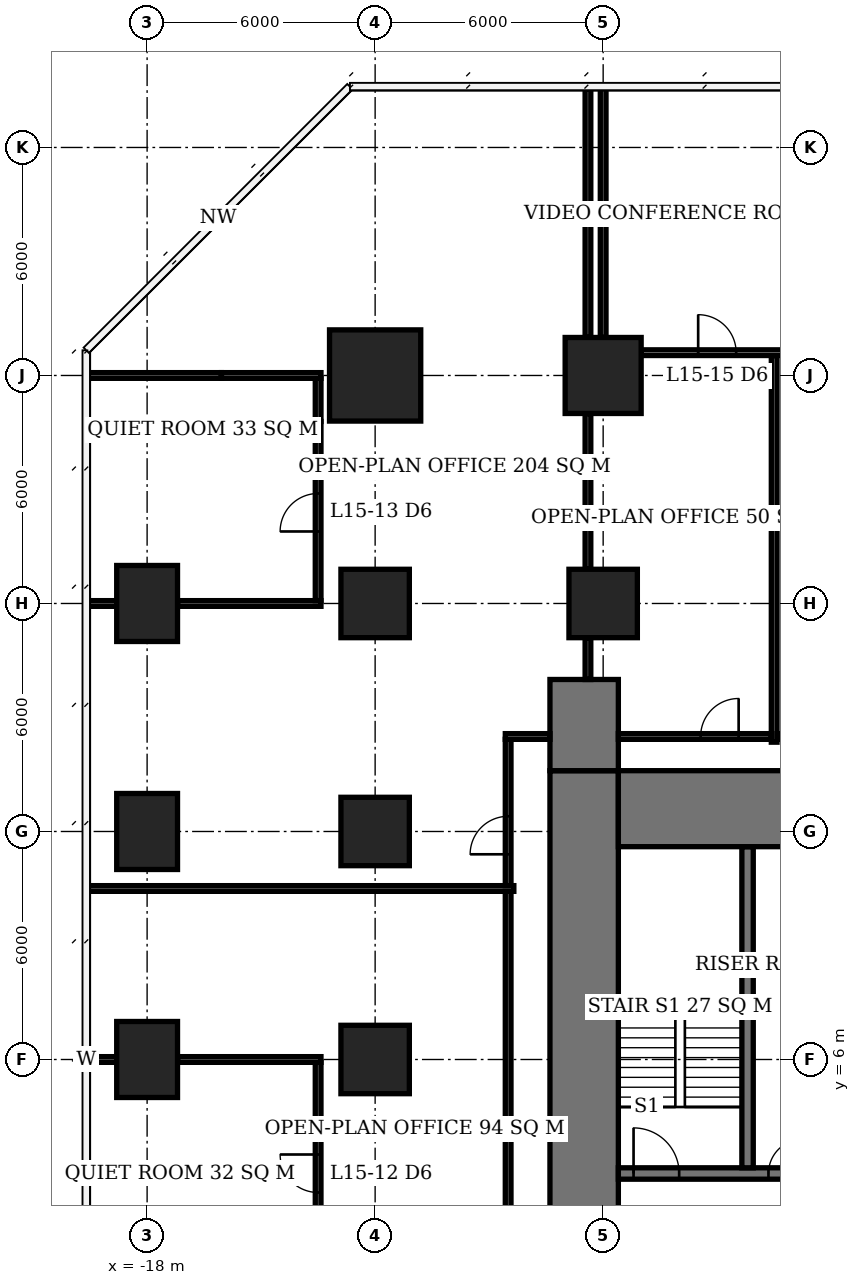
"""IFC4 building model, lengths in metres.
Left out: names, types, materials, properties, quantities, classifications, styles, units other than length and angle.
Written with IfcOpenShell. Run it as: python <this file> out.ifc"""

import sys

from ifc_helpers import new_model, si_unit, direction, frame, frame_2d, origin, origin_2d, place, context, subcontext, project, spatial, rectangle, extrude, element, fill, save


model = new_model("IFC4")
c1 = context("Model", 3, precision=1e-05, world=origin(), true_north=direction((0.0, 1.0)))
c2 = subcontext(c1, "Body", "Model", "MODEL_VIEW")
j1 = project(units=[si_unit("LENGTHUNIT", "METRE"), si_unit("PLANEANGLEUNIT", "RADIAN")], contexts=[c1])
p1 = place(None, origin())
s1 = spatial("IfcSite", under=j1, at=p1, CompositionType="ELEMENT")
p2 = place(p1, origin())
s2 = spatial("IfcBuilding", under=s1, at=p2, CompositionType="ELEMENT")
p3 = place(p2, frame((0.0, 0.0, 65.0)))
s3 = spatial("IfcBuildingStorey", under=s2, at=p3, CompositionType="ELEMENT", Elevation=65.0)
for number, where, z_axis, x_axis in (
    (1, (-18.0, 6.0, 0.0), (0.0, 0.0, 1.0), (0.0, 1.0, 0.0)),
    (2, (-18.0, 12.0, 0.0), (0.0, 0.0, 1.0), (0.0, 1.0, 0.0)),
    (3, (-18.0, 18.0, 0.0), (0.0, 0.0, 1.0), (0.0, 1.0, 0.0)),
):
    element("IfcColumn", number, at=place(p3, frame(where, z_axis=z_axis, x_axis=x_axis)), inside=s3, PredefinedType="COLUMN", context=c2, shape_type="SweptSolid", body=[
        extrude(rectangle(XDim=2.0, YDim=1.6, at=origin_2d()), origin(), (0.0, 0.0, 1.0), 3.9),
    ])
for number, where, z_axis, x_axis in (
    (4, (-12.0, 6.0, 0.0), (0.0, 0.0, 1.0), (1.0, 0.0, 0.0)),
    (5, (-12.0, 12.0, 0.0), (0.0, 0.0, 1.0), (1.0, 0.0, 0.0)),
    (6, (-12.0, 18.0, 0.0), (0.0, 0.0, 1.0), (1.0, 0.0, 0.0)),
):
    element("IfcColumn", number, at=place(p3, frame(where, z_axis=z_axis, x_axis=x_axis)), inside=s3, PredefinedType="COLUMN", context=c2, shape_type="SweptSolid", body=[
        extrude(rectangle(XDim=1.8, YDim=1.8, at=origin_2d()), origin(), (0.0, 0.0, 1.0), 3.9),
    ])
p4 = place(p3, frame((-12.0, 24.0, 0.0), z_axis=(0.0, 0.0, 1.0), x_axis=(1.0, 0.0, 0.0)))
e7 = element("IfcColumn", 7, at=p4, inside=s3, PredefinedType="COLUMN", context=c2, shape_type="SweptSolid", body=[
    extrude(rectangle(XDim=2.4, YDim=2.4, at=origin_2d()), origin(), (0.0, 0.0, 1.0), 3.9),
])
p5 = place(p3, frame((-6.0, 18.0, 0.0), z_axis=(0.0, 0.0, 1.0), x_axis=(1.0, 0.0, 0.0)))
e8 = element("IfcColumn", 8, at=p5, inside=s3, PredefinedType="COLUMN", context=c2, shape_type="SweptSolid", body=[
    extrude(rectangle(XDim=1.8, YDim=1.8, at=origin_2d()), origin(), (0.0, 0.0, 1.0), 3.9),
])
p6 = place(p3, frame((-6.0, 24.0, 0.0), z_axis=(0.0, 0.0, 1.0), x_axis=(1.0, 0.0, 0.0)))
e9 = element("IfcColumn", 9, at=p6, inside=s3, PredefinedType="COLUMN", context=c2, shape_type="SweptSolid", body=[
    extrude(rectangle(XDim=2.0, YDim=2.0, at=origin_2d()), origin(), (0.0, 0.0, 1.0), 3.9),
])
p7 = place(p3, frame((-5.6, 12.6, 0.0), z_axis=(0.0, 0.0, 1.0), x_axis=(1.0, 0.0, 0.0)))
e10 = element("IfcWall", 10, at=p7, inside=s3, PredefinedType="SHEAR", context=c2, shape_type="SweptSolid", body=[
    extrude(rectangle(XDim=23.2, YDim=2.0, at=frame_2d((11.6, 0.0))), origin(), (0.0, 0.0, 1.0), 3.9),
])
p8 = place(p3, frame((-6.5, -7.6, 0.0), z_axis=(0.0, 0.0, 1.0), x_axis=(0.0, 1.0, 0.0)))
e11 = element("IfcWall", 11, at=p8, inside=s3, PredefinedType="SHEAR", context=c2, shape_type="SweptSolid", body=[
    extrude(rectangle(XDim=21.2, YDim=1.8, at=frame_2d((10.6, 0.0))), origin(), (0.0, 0.0, 1.0), 3.9),
])
p9 = place(p8, frame((7.8, 0.0, 0.0)))
e12 = element("IfcOpeningElement", 12, at=p9, cuts=e11, PredefinedType="OPENING", context=c2, shape_type="SweptSolid", body=[
    extrude(rectangle(XDim=1.8, YDim=2.4, at=frame_2d((0.9, 1.2))), frame((0.0, 0.91, 0.0), z_axis=(0.0, -1.0, 0.0), x_axis=(1.0, 0.0, 0.0)), (0.0, 0.0, 1.0), 1.82),
])
p10 = place(p3, frame((-6.5, 13.6, 0.0), z_axis=(0.0, 0.0, 1.0), x_axis=(0.0, 1.0, 0.0)))
e13 = element("IfcWall", 13, at=p10, inside=s3, PredefinedType="SHEAR", context=c2, shape_type="SweptSolid", body=[
    extrude(rectangle(XDim=2.4, YDim=1.8, at=frame_2d((1.2, 0.0))), origin(), (0.0, 0.0, 1.0), 3.9),
])
p11 = place(p3, frame((-5.6, 3.0, 0.0), z_axis=(0.0, 0.0, 1.0), x_axis=(1.0, 0.0, 0.0)))
e14 = element("IfcWall", 14, at=p11, inside=s3, PredefinedType="SHEAR", context=c2, shape_type="SweptSolid", body=[
    extrude(rectangle(XDim=5.45, YDim=0.3, at=frame_2d((2.725, 0.0))), origin(), (0.0, 0.0, 1.0), 3.9),
])
p12 = place(p11, frame((0.4, 0.0, 0.0)))
e15 = element("IfcOpeningElement", 15, at=p12, cuts=e14, PredefinedType="OPENING", context=c2, shape_type="SweptSolid", body=[
    extrude(rectangle(XDim=1.2, YDim=2.1, at=frame_2d((0.6, 1.05))), frame((0.0, 0.16, 0.0), z_axis=(0.0, -1.0, 0.0), x_axis=(1.0, 0.0, 0.0)), (0.0, 0.0, 1.0), 0.32),
])
p13 = place(p11, frame((3.95, 0.0, 0.0)))
e16 = element("IfcOpeningElement", 16, at=p13, cuts=e14, PredefinedType="OPENING", context=c2, shape_type="SweptSolid", body=[
    extrude(rectangle(XDim=0.9, YDim=2.1, at=frame_2d((0.45, 1.05))), frame((0.0, 0.16, 0.0), z_axis=(0.0, -1.0, 0.0), x_axis=(1.0, 0.0, 0.0)), (0.0, 0.0, 1.0), 0.32),
])
p14 = place(p3, frame((-2.2, 3.15, 0.0), z_axis=(0.0, 0.0, 1.0), x_axis=(0.0, 1.0, 0.0)))
e17 = element("IfcWall", 17, at=p14, inside=s3, PredefinedType="SHEAR", context=c2, shape_type="SweptSolid", body=[
    extrude(rectangle(XDim=8.45, YDim=0.3, at=frame_2d((4.225, 0.0))), origin(), (0.0, 0.0, 1.0), 3.9),
])
p15 = place(p3, frame((-19.55, 6.0, 0.0), z_axis=(0.0, 0.0, 1.0), x_axis=(1.0, 0.0, 0.0)))
e18 = element("IfcWall", 18, at=p15, inside=s3, PredefinedType="PARTITIONING", context=c2, shape_type="SweptSolid", body=[
    extrude(rectangle(XDim=0.75, YDim=0.15, at=frame_2d((0.375, 0.0))), origin(), (0.0, 0.0, 1.0), 3.65),
])
p16 = place(p3, frame((-17.2, 6.0, 0.0), z_axis=(0.0, 0.0, 1.0), x_axis=(1.0, 0.0, 0.0)))
e19 = element("IfcWall", 19, at=p16, inside=s3, PredefinedType="PARTITIONING", context=c2, shape_type="SweptSolid", body=[
    extrude(rectangle(XDim=3.775, YDim=0.15, at=frame_2d((1.887, 0.0))), origin(), (0.0, 0.0, 1.0), 3.65),
])
p17 = place(p3, frame((-19.6, 18.0, 0.0), z_axis=(0.0, 0.0, 1.0), x_axis=(1.0, 0.0, 0.0)))
e20 = element("IfcWall", 20, at=p17, inside=s3, PredefinedType="PARTITIONING", context=c2, shape_type="SweptSolid", body=[
    extrude(rectangle(XDim=0.8, YDim=0.15, at=frame_2d((0.4, 0.0))), origin(), (0.0, 0.0, 1.0), 3.65),
])
p18 = place(p3, frame((-17.2, 18.0, 0.0), z_axis=(0.0, 0.0, 1.0), x_axis=(1.0, 0.0, 0.0)))
e21 = element("IfcWall", 21, at=p18, inside=s3, PredefinedType="PARTITIONING", context=c2, shape_type="SweptSolid", body=[
    extrude(rectangle(XDim=3.775, YDim=0.15, at=frame_2d((1.887, 0.0))), origin(), (0.0, 0.0, 1.0), 3.65),
])
p19 = place(p3, frame((-19.6, 24.0, 0.0), z_axis=(0.0, 0.0, 1.0), x_axis=(1.0, 0.0, 0.0)))
e22 = element("IfcWall", 22, at=p19, inside=s3, PredefinedType="PARTITIONING", context=c2, shape_type="SweptSolid", body=[
    extrude(rectangle(XDim=3.555, YDim=0.15, at=frame_2d((1.778, 0.0))), origin(), (0.0, 0.0, 1.0), 3.65),
])
p20 = place(p3, frame((-16.045, 24.0, 0.0), z_axis=(0.0, 0.0, 1.0), x_axis=(1.0, 0.0, 0.0)))
e23 = element("IfcWall", 23, at=p20, inside=s3, PredefinedType="PARTITIONING", context=c2, shape_type="SweptSolid", body=[
    extrude(rectangle(XDim=2.62, YDim=0.15, at=frame_2d((1.31, 0.0))), origin(), (0.0, 0.0, 1.0), 2.65),
])
p21 = place(p3, frame((-5.0, 24.6, 0.0), z_axis=(0.0, 0.0, 1.0), x_axis=(1.0, 0.0, 0.0)))
e24 = element("IfcWall", 24, at=p21, inside=s3, PredefinedType="PARTITIONING", context=c2, shape_type="SweptSolid", body=[
    extrude(rectangle(XDim=4.0, YDim=0.15, at=frame_2d((2.0, 0.0))), origin(), (0.0, 0.0, 1.0), 3.65),
])
p22 = place(p21, frame((1.5, 0.0, 0.0)))
e25 = element("IfcOpeningElement", 25, at=p22, cuts=e24, PredefinedType="OPENING", context=c2, shape_type="SweptSolid", body=[
    extrude(rectangle(XDim=1.0, YDim=2.1, at=frame_2d((0.5, 1.05))), frame((0.0, 0.085, 0.0), z_axis=(0.0, -1.0, 0.0), x_axis=(1.0, 0.0, 0.0)), (0.0, 0.0, 1.0), 0.17),
])
p23 = place(p3, frame((-13.5, 0.075, 0.0), z_axis=(0.0, 0.0, 1.0), x_axis=(0.0, 1.0, 0.0)))
e26 = element("IfcWall", 26, at=p23, inside=s3, PredefinedType="PARTITIONING", context=c2, shape_type="SweptSolid", body=[
    extrude(rectangle(XDim=5.85, YDim=0.15, at=frame_2d((2.925, 0.0))), origin(), (0.0, 0.0, 1.0), 3.65),
])
p24 = place(p23, frame((2.425, 0.0, 0.0)))
e27 = element("IfcOpeningElement", 27, at=p24, cuts=e26, PredefinedType="OPENING", context=c2, shape_type="SweptSolid", body=[
    extrude(rectangle(XDim=1.0, YDim=2.1, at=frame_2d((0.5, 1.05))), frame((0.0, 0.085, 0.0), z_axis=(0.0, -1.0, 0.0), x_axis=(1.0, 0.0, 0.0)), (0.0, 0.0, 1.0), 0.17),
])
p25 = place(p3, frame((-13.5, 18.075, 0.0), z_axis=(0.0, 0.0, 1.0), x_axis=(0.0, 1.0, 0.0)))
e28 = element("IfcWall", 28, at=p25, inside=s3, PredefinedType="PARTITIONING", context=c2, shape_type="SweptSolid", body=[
    extrude(rectangle(XDim=4.715, YDim=0.15, at=frame_2d((2.357, 0.0))), origin(), (0.0, 0.0, 1.0), 3.65),
])
p26 = place(p25, frame((1.82, 0.0, 0.0)))
e29 = element("IfcOpeningElement", 29, at=p26, cuts=e28, PredefinedType="OPENING", context=c2, shape_type="SweptSolid", body=[
    extrude(rectangle(XDim=1.0, YDim=2.1, at=frame_2d((0.5, 1.05))), frame((0.0, 0.085, 0.0), z_axis=(0.0, -1.0, 0.0), x_axis=(1.0, 0.0, 0.0)), (0.0, 0.0, 1.0), 0.17),
])
p27 = place(p3, frame((-13.5, 22.79, 0.0), z_axis=(0.0, 0.0, 1.0), x_axis=(0.0, 1.0, 0.0)))
e30 = element("IfcWall", 30, at=p27, inside=s3, PredefinedType="PARTITIONING", context=c2, shape_type="SweptSolid", body=[
    extrude(rectangle(XDim=1.135, YDim=0.15, at=frame_2d((0.567, 0.0))), origin(), (0.0, 0.0, 1.0), 2.65),
])
p28 = place(p3, frame((-6.0, 25.0, 0.0), z_axis=(0.0, 0.0, 1.0), x_axis=(0.0, 1.0, 0.0)))
e31 = element("IfcWall", 31, at=p28, inside=s3, PredefinedType="PARTITIONING", context=c2, shape_type="SweptSolid", body=[
    extrude(rectangle(XDim=3.31, YDim=0.15, at=frame_2d((1.655, 0.0))), origin(), (0.0, 0.0, 1.0), 2.65),
])
p29 = place(p3, frame((-6.0, 28.31, 0.0), z_axis=(0.0, 0.0, 1.0), x_axis=(0.0, 1.0, 0.0)))
e32 = element("IfcWall", 32, at=p29, inside=s3, PredefinedType="PARTITIONING", context=c2, shape_type="SweptSolid", body=[
    extrude(rectangle(XDim=3.29, YDim=0.15, at=frame_2d((1.645, 0.0))), origin(), (0.0, 0.0, 1.0), 3.65),
])
p30 = place(p3, frame((-19.6, 10.5, 0.0), z_axis=(0.0, 0.0, 1.0), x_axis=(1.0, 0.0, 0.0)))
e33 = element("IfcWall", 33, at=p30, inside=s3, PredefinedType="PARTITIONING", context=c2, shape_type="SweptSolid", body=[
    extrude(rectangle(XDim=11.25, YDim=0.15, at=frame_2d((5.625, 0.0))), origin(), (0.0, 0.0, 1.0), 3.65),
])
p31 = place(p3, frame((-8.5, -4.425, 0.0), z_axis=(0.0, 0.0, 1.0), x_axis=(0.0, 1.0, 0.0)))
e34 = element("IfcWall", 34, at=p31, inside=s3, PredefinedType="PARTITIONING", context=c2, shape_type="SweptSolid", body=[
    extrude(rectangle(XDim=14.85, YDim=0.15, at=frame_2d((7.425, 0.0))), origin(), (0.0, 0.0, 1.0), 3.65),
])
p32 = place(p31, frame((4.675, 0.0, 0.0)))
e35 = element("IfcOpeningElement", 35, at=p32, cuts=e34, PredefinedType="OPENING", context=c2, shape_type="SweptSolid", body=[
    extrude(rectangle(XDim=1.0, YDim=2.1, at=frame_2d((0.5, 1.05))), frame((0.0, 0.085, 0.0), z_axis=(0.0, -1.0, 0.0), x_axis=(1.0, 0.0, 0.0)), (0.0, 0.0, 1.0), 0.17),
])
p33 = place(p3, frame((-8.5, 10.575, 0.0), z_axis=(0.0, 0.0, 1.0), x_axis=(0.0, 1.0, 0.0)))
e36 = element("IfcWall", 36, at=p33, inside=s3, PredefinedType="PARTITIONING", context=c2, shape_type="SweptSolid", body=[
    extrude(rectangle(XDim=3.85, YDim=0.15, at=frame_2d((1.925, 0.0))), origin(), (0.0, 0.0, 1.0), 3.65),
])
p34 = place(p33, frame((0.825, 0.0, 0.0)))
e37 = element("IfcOpeningElement", 37, at=p34, cuts=e36, PredefinedType="OPENING", context=c2, shape_type="SweptSolid", body=[
    extrude(rectangle(XDim=1.0, YDim=2.1, at=frame_2d((0.5, 1.05))), frame((0.0, 0.085, 0.0), z_axis=(0.0, -1.0, 0.0), x_axis=(1.0, 0.0, 0.0)), (0.0, 0.0, 1.0), 0.17),
])
p35 = place(p3, frame((-8.575, 14.5, 0.0), z_axis=(0.0, 0.0, 1.0), x_axis=(1.0, 0.0, 0.0)))
e38 = element("IfcWall", 38, at=p35, inside=s3, PredefinedType="PARTITIONING", context=c2, shape_type="SweptSolid", body=[
    extrude(rectangle(XDim=1.175, YDim=0.15, at=frame_2d((0.587, 0.0))), origin(), (0.0, 0.0, 1.0), 3.65),
])
p36 = place(p3, frame((-6.4, 16.0, 0.0), z_axis=(0.0, 0.0, 1.0), x_axis=(0.0, 1.0, 0.0)))
e39 = element("IfcWall", 39, at=p36, inside=s3, PredefinedType="PARTITIONING", context=c2, shape_type="SweptSolid", body=[
    extrude(rectangle(XDim=1.1, YDim=0.15, at=frame_2d((0.55, 0.0))), origin(), (0.0, 0.0, 1.0), 3.65),
])
p37 = place(p3, frame((-6.4, 18.9, 0.0), z_axis=(0.0, 0.0, 1.0), x_axis=(0.0, 1.0, 0.0)))
e40 = element("IfcWall", 40, at=p37, inside=s3, PredefinedType="PARTITIONING", context=c2, shape_type="SweptSolid", body=[
    extrude(rectangle(XDim=4.1, YDim=0.15, at=frame_2d((2.05, 0.0))), origin(), (0.0, 0.0, 1.0), 3.65),
])
p38 = place(p3, frame((-6.4, 25.0, 0.0), z_axis=(0.0, 0.0, 1.0), x_axis=(0.0, 1.0, 0.0)))
e41 = element("IfcWall", 41, at=p38, inside=s3, PredefinedType="PARTITIONING", context=c2, shape_type="SweptSolid", body=[
    extrude(rectangle(XDim=3.31, YDim=0.15, at=frame_2d((1.655, 0.0))), origin(), (0.0, 0.0, 1.0), 2.65),
])
p39 = place(p3, frame((-6.4, 28.31, 0.0), z_axis=(0.0, 0.0, 1.0), x_axis=(0.0, 1.0, 0.0)))
e42 = element("IfcWall", 42, at=p39, inside=s3, PredefinedType="PARTITIONING", context=c2, shape_type="SweptSolid", body=[
    extrude(rectangle(XDim=3.24, YDim=0.15, at=frame_2d((1.62, 0.0))), origin(), (0.0, 0.0, 1.0), 3.65),
])
p40 = place(p3, frame((-5.6, 14.5, 0.0), z_axis=(0.0, 0.0, 1.0), x_axis=(1.0, 0.0, 0.0)))
e43 = element("IfcWall", 43, at=p40, inside=s3, PredefinedType="PARTITIONING", context=c2, shape_type="SweptSolid", body=[
    extrude(rectangle(XDim=4.025, YDim=0.15, at=frame_2d((2.013, 0.0))), origin(), (0.0, 0.0, 1.0), 3.65),
])
p41 = place(p40, frame((2.165, 0.0, 0.0)))
e44 = element("IfcOpeningElement", 44, at=p41, cuts=e43, PredefinedType="OPENING", context=c2, shape_type="SweptSolid", body=[
    extrude(rectangle(XDim=1.0, YDim=2.1, at=frame_2d((0.5, 1.05))), frame((0.0, 0.085, 0.0), z_axis=(0.0, -1.0, 0.0), x_axis=(1.0, 0.0, 0.0)), (0.0, 0.0, 1.0), 0.17),
])
p42 = place(p3, frame((-1.5, 14.35, 0.0), z_axis=(0.0, 0.0, 1.0), x_axis=(0.0, 1.0, 0.0)))
e45 = element("IfcWall", 45, at=p42, inside=s3, PredefinedType="PARTITIONING", context=c2, shape_type="SweptSolid", body=[
    extrude(rectangle(XDim=10.175, YDim=0.15, at=frame_2d((5.087, 0.0))), origin(), (0.0, 0.0, 1.0), 3.65),
])
p43 = place(p3, frame((-1.425, 14.5, 0.0), z_axis=(0.0, 0.0, 1.0), x_axis=(1.0, 0.0, 0.0)))
e46 = element("IfcWall", 46, at=p43, inside=s3, PredefinedType="PARTITIONING", context=c2, shape_type="SweptSolid", body=[
    extrude(rectangle(XDim=11.85, YDim=0.15, at=frame_2d((5.925, 0.0))), origin(), (0.0, 0.0, 1.0), 3.65),
])
p44 = place(p43, frame((7.225, 0.0, 0.0)))
e47 = element("IfcOpeningElement", 47, at=p44, cuts=e46, PredefinedType="OPENING", context=c2, shape_type="SweptSolid", body=[
    extrude(rectangle(XDim=1.0, YDim=2.1, at=frame_2d((0.5, 1.05))), frame((0.0, 0.085, 0.0), z_axis=(0.0, -1.0, 0.0), x_axis=(1.0, 0.0, 0.0)), (0.0, 0.0, 1.0), 0.17),
])
p45 = place(p12, origin())
e48 = element("IfcDoor", 48, at=p45, inside=s3, OperationType="SINGLE_SWING_LEFT", PredefinedType="DOOR", context=c2, shape_type="SweptSolid", body=[
    extrude(rectangle(XDim=1.2, YDim=2.1, at=frame_2d((0.6, 1.05))), frame((0.0, 0.025, 0.0), z_axis=(0.0, -1.0, 0.0), x_axis=(1.0, 0.0, 0.0)), (0.0, 0.0, 1.0), 0.05),
])
fill(e15, e48)
p46 = place(p13, origin())
e49 = element("IfcDoor", 49, at=p46, inside=s3, OperationType="SINGLE_SWING_RIGHT", PredefinedType="DOOR", context=c2, shape_type="SweptSolid", body=[
    extrude(rectangle(XDim=0.9, YDim=2.1, at=frame_2d((0.45, 1.05))), frame((0.0, 0.025, 0.0), z_axis=(0.0, -1.0, 0.0), x_axis=(1.0, 0.0, 0.0)), (0.0, 0.0, 1.0), 0.05),
])
fill(e16, e49)
p47 = place(p24, origin())
e50 = element("IfcDoor", 50, at=p47, inside=s3, OperationType="SINGLE_SWING_RIGHT", PredefinedType="DOOR", context=c2, shape_type="SweptSolid", body=[
    extrude(rectangle(XDim=1.0, YDim=2.1, at=frame_2d((0.5, 1.05))), frame((0.0, 0.025, 0.0), z_axis=(0.0, -1.0, 0.0), x_axis=(1.0, 0.0, 0.0)), (0.0, 0.0, 1.0), 0.05),
])
fill(e27, e50)
p48 = place(p26, origin())
e51 = element("IfcDoor", 51, at=p48, inside=s3, OperationType="SINGLE_SWING_LEFT", PredefinedType="DOOR", context=c2, shape_type="SweptSolid", body=[
    extrude(rectangle(XDim=1.0, YDim=2.1, at=frame_2d((0.5, 1.05))), frame((0.0, 0.025, 0.0), z_axis=(0.0, -1.0, 0.0), x_axis=(1.0, 0.0, 0.0)), (0.0, 0.0, 1.0), 0.05),
])
fill(e29, e51)
p49 = place(p22, origin())
e52 = element("IfcDoor", 52, at=p49, inside=s3, OperationType="SINGLE_SWING_LEFT", PredefinedType="DOOR", context=c2, shape_type="SweptSolid", body=[
    extrude(rectangle(XDim=1.0, YDim=2.1, at=frame_2d((0.5, 1.05))), frame((0.0, 0.025, 0.0), z_axis=(0.0, -1.0, 0.0), x_axis=(1.0, 0.0, 0.0)), (0.0, 0.0, 1.0), 0.05),
])
fill(e25, e52)
p50 = place(p34, origin())
e53 = element("IfcDoor", 53, at=p50, inside=s3, OperationType="SINGLE_SWING_LEFT", PredefinedType="DOOR", context=c2, shape_type="SweptSolid", body=[
    extrude(rectangle(XDim=1.0, YDim=2.1, at=frame_2d((0.5, 1.05))), frame((0.0, 0.025, 0.0), z_axis=(0.0, -1.0, 0.0), x_axis=(1.0, 0.0, 0.0)), (0.0, 0.0, 1.0), 0.05),
])
fill(e37, e53)
p51 = place(p41, origin())
e54 = element("IfcDoor", 54, at=p51, inside=s3, OperationType="SINGLE_SWING_RIGHT", PredefinedType="DOOR", context=c2, shape_type="SweptSolid", body=[
    extrude(rectangle(XDim=1.0, YDim=2.1, at=frame_2d((0.5, 1.05))), frame((0.0, 0.025, 0.0), z_axis=(0.0, -1.0, 0.0), x_axis=(1.0, 0.0, 0.0)), (0.0, 0.0, 1.0), 0.05),
])
fill(e44, e54)
save(model, sys.argv[1])
